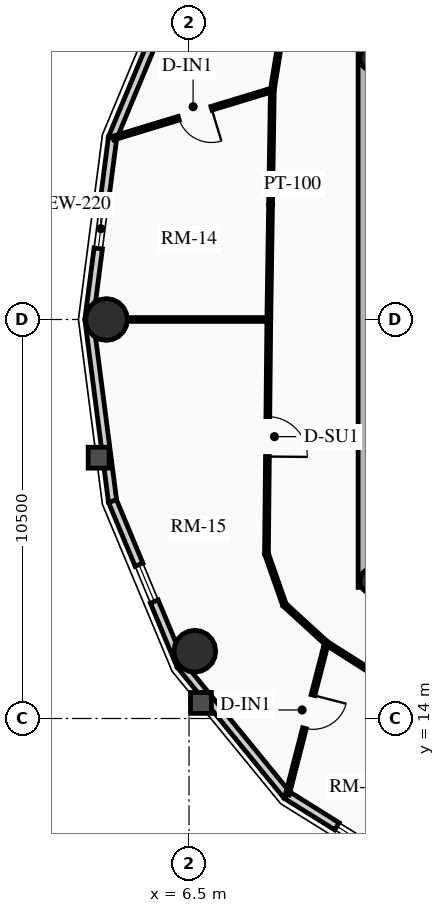
"""IFC4 building model, lengths in metres.
Left out: names, types, materials, properties, quantities, classifications, styles, units other than length and angle.
Written with IfcOpenShell. Run it as: python <this file> out.ifc"""

import sys

from ifc_helpers import new_model, si_unit, direction, frame, frame_2d, origin, origin_2d, place, context, subcontext, project, spatial, rectangle, circle, hollow_circle, extrude, source, transform, mapped, element, fill, save


model = new_model("IFC4")
c1 = context("Model", 3, precision=1e-05, world=origin(), true_north=direction((0.0, 1.0)))
c2 = subcontext(c1, "Body", "Model", "MODEL_VIEW")
j1 = project(units=[si_unit("LENGTHUNIT", "METRE"), si_unit("PLANEANGLEUNIT", "RADIAN")], contexts=[c1])
p1 = place(None, origin())
s1 = spatial("IfcSite", under=j1, at=p1, CompositionType="ELEMENT")
p2 = place(p1, origin())
s2 = spatial("IfcBuilding", under=s1, at=p2, CompositionType="ELEMENT")
p3 = place(p2, frame((0.0, 0.0, 229.25)))
s3 = spatial("IfcBuildingStorey", under=s2, at=p3, CompositionType="ELEMENT", Elevation=229.25)
p4 = place(p3, frame((11.15, 17.45, 0.0), z_axis=(0.0, 0.0, 1.0), x_axis=(0.0, 1.0, 0.0)))
e1 = element("IfcWall", 1, at=p4, inside=s3, PredefinedType="SHEAR", context=c2, shape_type="SweptSolid", body=[
    extrude(rectangle(XDim=14.1, YDim=0.4, at=frame_2d((7.05, 0.0))), origin(), (0.0, 0.0, 1.0), 3.2),
])
for number, where, z_axis, x_axis in (
    (2, (11.325, 17.62, 0.0), (0.0, 0.0, 1.0), (1.0, 0.0, 0.0)),
    (3, (11.325, 31.38, 0.0), (0.0, 0.0, 1.0), (1.0, 0.0, 0.0)),
):
    element("IfcColumn", number, at=place(p3, frame(where, z_axis=z_axis, x_axis=x_axis)), inside=s3, PredefinedType="COLUMN", context=c2, shape_type="SweptSolid", body=[
        extrude(hollow_circle(Radius=0.33, WallThickness=0.025, at=origin_2d()), origin(), (0.0, 0.0, 1.0), 3.2),
    ])
for number, where, z_axis, x_axis in (
    (4, (4.328, 24.5, 0.0), (0.0, 0.0, 1.0), (1.0, 0.0, 0.0)),
    (5, (6.653, 15.771, 0.0), (0.0, 0.0, 1.0), (1.0, 0.0, 0.0)),
):
    element("IfcColumn", number, at=place(p3, frame(where, z_axis=z_axis, x_axis=x_axis)), inside=s3, PredefinedType="USERDEFINED", context=c2, shape_type="SweptSolid", body=[
        extrude(circle(Radius=0.55, at=origin_2d()), origin(), (0.0, 0.0, 1.0), 3.2),
    ])
p5 = place(p3, frame((4.488, 29.281, 0.0), z_axis=(0.0, 0.0, 1.0), x_axis=(0.384036305194, 0.923317993052, 0.0)))
e6 = element("IfcWall", 6, at=p5, inside=s3, PredefinedType="SOLIDWALL", context=c2, shape_type="SweptSolid", body=[
    extrude(rectangle(XDim=4.671, YDim=0.22, at=frame_2d((2.335, 0.0))), origin(), (0.0, 0.0, 1.0), 2.612),
])
p6 = place(p3, frame((3.87, 24.5, 0.0), z_axis=(0.0, 0.0, 1.0), x_axis=(0.128241318541, 0.991742993027, 0.0)))
e7 = element("IfcWall", 7, at=p6, inside=s3, PredefinedType="SOLIDWALL", context=c2, shape_type="SweptSolid", body=[
    extrude(rectangle(XDim=4.82, YDim=0.22, at=frame_2d((2.41, 0.0))), origin(), (0.0, 0.0, 1.0), 2.612),
])
m1 = source(origin(), c2, "Body", "SweptSolid", [
    extrude(rectangle(XDim=1.05, YDim=1.3, at=frame_2d((0.525, 0.65))), frame((0.0, 0.12, 0.0), z_axis=(0.0, -1.0, 0.0), x_axis=(1.0, 0.0, 0.0)), (0.0, 0.0, 1.0), 0.24),
])
p7 = place(p6, frame((1.885, 0.0, 0.65)))
e8 = element("IfcOpeningElement", 8, at=p7, cuts=e7, PredefinedType="OPENING", context=c2, shape_type="MappedRepresentation", body=[
    mapped(m1, transform((0.0, 0.0, 0.0), x_axis=(1.0, 0.0, 0.0), y_axis=(0.0, 1.0, 0.0), z_axis=(0.0, 0.0, 1.0), scale=1.0)),
])
p8 = place(p3, frame((4.488, 19.719, 0.0), z_axis=(0.0, 0.0, 1.0), x_axis=(-0.128241318541, 0.991742993027, 0.0)))
e9 = element("IfcWall", 9, at=p8, inside=s3, PredefinedType="SOLIDWALL", context=c2, shape_type="SweptSolid", body=[
    extrude(rectangle(XDim=4.82, YDim=0.22, at=frame_2d((2.41, 0.0))), origin(), (0.0, 0.0, 1.0), 2.612),
])
p9 = place(p3, frame((6.282, 15.407, 0.0), z_axis=(0.0, 0.0, 1.0), x_axis=(-0.384036305194, 0.923317993052, 0.0)))
e10 = element("IfcWall", 10, at=p9, inside=s3, PredefinedType="SOLIDWALL", context=c2, shape_type="SweptSolid", body=[
    extrude(rectangle(XDim=4.671, YDim=0.22, at=frame_2d((2.335, 0.0))), origin(), (0.0, 0.0, 1.0), 2.612),
])
p10 = place(p9, frame((1.81, 0.0, 0.65)))
e11 = element("IfcOpeningElement", 11, at=p10, cuts=e10, PredefinedType="OPENING", context=c2, shape_type="MappedRepresentation", body=[
    mapped(m1, transform((0.0, 0.0, 0.0), x_axis=(1.0, 0.0, 0.0), y_axis=(0.0, 1.0, 0.0), z_axis=(0.0, 0.0, 1.0), scale=1.0)),
])
p11 = place(p3, frame((9.076, 11.985, 0.0), z_axis=(0.0, 0.0, 1.0), x_axis=(-0.632467166636, 0.774587169483, 0.0)))
e12 = element("IfcWall", 12, at=p11, inside=s3, PredefinedType="SOLIDWALL", context=c2, shape_type="SweptSolid", body=[
    extrude(rectangle(XDim=4.418, YDim=0.22, at=frame_2d((2.209, 0.0))), origin(), (0.0, 0.0, 1.0), 2.612),
])
p12 = place(p3, frame((12.597, 9.787, 0.0), z_axis=(0.0, 0.0, 1.0), x_axis=(-0.848318713376, 0.529485939886, 0.0)))
e13 = element("IfcWall", 13, at=p12, inside=s3, PredefinedType="SOLIDWALL", context=c2, shape_type="SweptSolid", body=[
    extrude(rectangle(XDim=4.15, YDim=0.22, at=frame_2d((2.075, 0.0))), origin(), (0.0, 0.0, 1.0), 2.612),
])
p13 = place(p12, frame((1.55, 0.0, 0.65)))
e14 = element("IfcOpeningElement", 14, at=p13, cuts=e13, PredefinedType="OPENING", context=c2, shape_type="MappedRepresentation", body=[
    mapped(m1, transform((0.0, 0.0, 0.0), x_axis=(1.0, 0.0, 0.0), y_axis=(0.0, 1.0, 0.0), z_axis=(0.0, 0.0, 1.0), scale=1.0)),
])
p14 = place(p3, frame((8.94, 32.078, 0.0), z_axis=(0.0, 0.0, 1.0), x_axis=(-0.159148467753, -0.98725466077, 0.0)))
e15 = element("IfcWall", 15, at=p14, inside=s3, PredefinedType="MOVABLE", context=c2, shape_type="SweptSolid", body=[
    extrude(rectangle(XDim=1.554, YDim=0.1, at=frame_2d((0.777, 0.0))), origin(), (0.0, 0.0, 1.0), 2.545),
])
p15 = place(p3, frame((8.693, 30.544, 0.0), z_axis=(0.0, 0.0, 1.0), x_axis=(-0.015307007986, -0.99988284089, 0.0)))
e16 = element("IfcWall", 16, at=p15, inside=s3, PredefinedType="MOVABLE", context=c2, shape_type="SweptSolid", body=[
    extrude(rectangle(XDim=6.045, YDim=0.1, at=frame_2d((3.022, 0.0))), origin(), (0.0, 0.0, 1.0), 2.545),
])
p16 = place(p3, frame((8.6, 24.5, 0.0), z_axis=(0.0, 0.0, 1.0), x_axis=(-0.010023665349, -0.999949761805, 0.0)))
e17 = element("IfcWall", 17, at=p16, inside=s3, PredefinedType="MOVABLE", context=c2, shape_type="SweptSolid", body=[
    extrude(rectangle(XDim=6.162, YDim=0.1, at=frame_2d((3.081, 0.0))), origin(), (0.0, 0.0, 1.0), 2.545),
])
m2 = source(origin(), c2, "Body", "SweptSolid", [
    extrude(rectangle(XDim=1.05, YDim=2.015, at=frame_2d((0.525, 1.007))), frame((0.0, 0.06, 0.0), z_axis=(0.0, -1.0, 0.0), x_axis=(1.0, 0.0, 0.0)), (0.0, 0.0, 1.0), 0.12),
])
p17 = place(p16, frame((2.556, 0.0, 0.0)))
e18 = element("IfcOpeningElement", 18, at=p17, cuts=e17, PredefinedType="OPENING", context=c2, shape_type="MappedRepresentation", body=[
    mapped(m2, transform((0.0, 0.0, 0.0), x_axis=(1.0, 0.0, 0.0), y_axis=(0.0, 1.0, 0.0), z_axis=(0.0, 0.0, 1.0), scale=1.0)),
])
p18 = place(p3, frame((8.538, 18.338, 0.0), z_axis=(0.0, 0.0, 1.0), x_axis=(0.331358150167, -0.94350504838, 0.0)))
e19 = element("IfcWall", 19, at=p18, inside=s3, PredefinedType="MOVABLE", context=c2, shape_type="SweptSolid", body=[
    extrude(rectangle(XDim=1.424, YDim=0.1, at=frame_2d((0.712, 0.0))), origin(), (0.0, 0.0, 1.0), 2.545),
])
p19 = place(p3, frame((9.01, 16.994, 0.0), z_axis=(0.0, 0.0, 1.0), x_axis=(0.737701798986, -0.67512669609, 0.0)))
e20 = element("IfcWall", 20, at=p19, inside=s3, PredefinedType="MOVABLE", context=c2, shape_type="SweptSolid", body=[
    extrude(rectangle(XDim=1.498, YDim=0.1, at=frame_2d((0.749, 0.0))), origin(), (0.0, 0.0, 1.0), 2.612),
])
p20 = place(p3, frame((10.115, 15.983, 0.0), z_axis=(0.0, 0.0, 1.0), x_axis=(0.843995849351, -0.536349705209, 0.0)))
e21 = element("IfcWall", 21, at=p20, inside=s3, PredefinedType="MOVABLE", context=c2, shape_type="SweptSolid", body=[
    extrude(rectangle(XDim=1.593, YDim=0.1, at=frame_2d((0.796, 0.0))), origin(), (0.0, 0.0, 1.0), 2.545),
])
p21 = place(p3, frame((8.6, 24.5, 0.0), z_axis=(0.0, 0.0, 1.0), x_axis=(-1.0, 0.0, 0.0)))
e22 = element("IfcWall", 22, at=p21, inside=s3, PredefinedType="MOVABLE", context=c2, shape_type="SweptSolid", body=[
    extrude(rectangle(XDim=4.71, YDim=0.1, at=frame_2d((2.355, 0.0))), origin(), (0.0, 0.0, 1.0), 2.612),
])
p22 = place(p3, frame((8.693, 30.544, 0.0), z_axis=(0.0, 0.0, 1.0), x_axis=(-0.956933754187, -0.290306372814, 0.0)))
e23 = element("IfcWall", 23, at=p22, inside=s3, PredefinedType="MOVABLE", context=c2, shape_type="SweptSolid", body=[
    extrude(rectangle(XDim=4.374, YDim=0.1, at=frame_2d((2.187, 0.0))), origin(), (0.0, 0.0, 1.0), 2.545),
])
m3 = source(origin(), c2, "Body", "SweptSolid", [
    extrude(rectangle(XDim=0.9, YDim=2.005, at=frame_2d((0.45, 1.002))), frame((0.0, 0.06, 0.0), z_axis=(0.0, -1.0, 0.0), x_axis=(1.0, 0.0, 0.0)), (0.0, 0.0, 1.0), 0.12),
])
p23 = place(p22, frame((1.674, 0.0, 0.0)))
e24 = element("IfcOpeningElement", 24, at=p23, cuts=e23, PredefinedType="OPENING", context=c2, shape_type="MappedRepresentation", body=[
    mapped(m3, transform((0.0, 0.0, 0.0), x_axis=(1.0, 0.0, 0.0), y_axis=(0.0, 1.0, 0.0), z_axis=(0.0, 0.0, 1.0), scale=1.0)),
])
p24 = place(p3, frame((10.115, 15.983, 0.0), z_axis=(0.0, 0.0, 1.0), x_axis=(-0.249861860474, -0.968281493513, 0.0)))
e25 = element("IfcWall", 25, at=p24, inside=s3, PredefinedType="MOVABLE", context=c2, shape_type="SweptSolid", body=[
    extrude(rectangle(XDim=4.113, YDim=0.1, at=frame_2d((2.056, 0.0))), origin(), (0.0, 0.0, 1.0), 2.545),
])
p25 = place(p24, frame((1.413, 0.0, 0.0)))
e26 = element("IfcOpeningElement", 26, at=p25, cuts=e25, PredefinedType="OPENING", context=c2, shape_type="MappedRepresentation", body=[
    mapped(m3, transform((0.0, 0.0, 0.0), x_axis=(1.0, 0.0, 0.0), y_axis=(0.0, 1.0, 0.0), z_axis=(0.0, 0.0, 1.0), scale=1.0)),
])
m4 = source(origin(), c2, "Body", "SweptSolid", [
    extrude(rectangle(XDim=1.05, YDim=1.3, at=frame_2d((0.525, 0.65))), frame((0.0, 0.03, 0.0), z_axis=(0.0, -1.0, 0.0), x_axis=(1.0, 0.0, 0.0)), (0.0, 0.0, 1.0), 0.06),
])
p26 = place(p7, origin())
e27 = element("IfcWindow", 27, at=p26, inside=s3, PartitioningType="SINGLE_PANEL", PredefinedType="WINDOW", context=c2, shape_type="MappedRepresentation", body=[
    mapped(m4, transform((0.0, 0.0, 0.0), x_axis=(1.0, 0.0, 0.0), y_axis=(0.0, 1.0, 0.0), z_axis=(0.0, 0.0, 1.0), scale=1.0)),
])
fill(e8, e27)
p27 = place(p10, origin())
e28 = element("IfcWindow", 28, at=p27, inside=s3, PartitioningType="SINGLE_PANEL", PredefinedType="WINDOW", context=c2, shape_type="MappedRepresentation", body=[
    mapped(m4, transform((0.0, 0.0, 0.0), x_axis=(1.0, 0.0, 0.0), y_axis=(0.0, 1.0, 0.0), z_axis=(0.0, 0.0, 1.0), scale=1.0)),
])
fill(e11, e28)
p28 = place(p13, origin())
e29 = element("IfcWindow", 29, at=p28, inside=s3, PartitioningType="SINGLE_PANEL", PredefinedType="WINDOW", context=c2, shape_type="MappedRepresentation", body=[
    mapped(m4, transform((0.0, 0.0, 0.0), x_axis=(1.0, 0.0, 0.0), y_axis=(0.0, 1.0, 0.0), z_axis=(0.0, 0.0, 1.0), scale=1.0)),
])
fill(e14, e29)
m5 = source(origin(), c2, "Body", "SweptSolid", [
    extrude(rectangle(XDim=0.9, YDim=2.005, at=frame_2d((0.45, 1.002))), frame((0.0, 0.025, 0.0), z_axis=(0.0, -1.0, 0.0), x_axis=(1.0, 0.0, 0.0)), (0.0, 0.0, 1.0), 0.05),
])
p29 = place(p23, origin())
e30 = element("IfcDoor", 30, at=p29, inside=s3, OperationType="SINGLE_SWING_LEFT", PredefinedType="DOOR", context=c2, shape_type="MappedRepresentation", body=[
    mapped(m5, transform((0.0, 0.0, 0.0), x_axis=(1.0, 0.0, 0.0), y_axis=(0.0, 1.0, 0.0), z_axis=(0.0, 0.0, 1.0), scale=1.0)),
])
fill(e24, e30)
m6 = source(origin(), c2, "Body", "SweptSolid", [
    extrude(rectangle(XDim=1.05, YDim=2.015, at=frame_2d((0.525, 1.007))), frame((0.0, 0.025, 0.0), z_axis=(0.0, -1.0, 0.0), x_axis=(1.0, 0.0, 0.0)), (0.0, 0.0, 1.0), 0.05),
])
p30 = place(p17, origin())
e31 = element("IfcDoor", 31, at=p30, inside=s3, OperationType="SINGLE_SWING_RIGHT", PredefinedType="DOOR", context=c2, shape_type="MappedRepresentation", body=[
    mapped(m6, transform((0.0, 0.0, 0.0), x_axis=(1.0, 0.0, 0.0), y_axis=(0.0, 1.0, 0.0), z_axis=(0.0, 0.0, 1.0), scale=1.0)),
])
fill(e18, e31)
p31 = place(p25, origin())
e32 = element("IfcDoor", 32, at=p31, inside=s3, OperationType="SINGLE_SWING_LEFT", PredefinedType="DOOR", context=c2, shape_type="MappedRepresentation", body=[
    mapped(m5, transform((0.0, 0.0, 0.0), x_axis=(1.0, 0.0, 0.0), y_axis=(0.0, 1.0, 0.0), z_axis=(0.0, 0.0, 1.0), scale=1.0)),
])
fill(e26, e32)
save(model, sys.argv[1])
